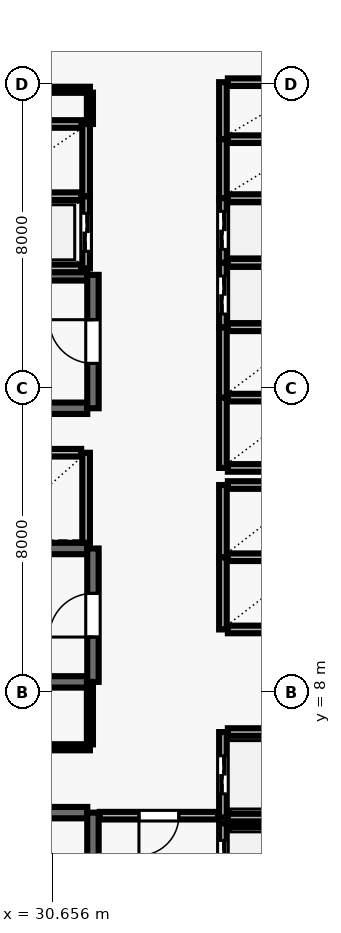
"""IFC4 building model, lengths in metres.
Left out: names, types, materials, properties, quantities, classifications, styles, units other than length and angle.
Written with IfcOpenShell. Run it as: python <this file> out.ifc"""

import sys

from ifc_helpers import new_model, si_unit, direction, frame, frame_2d, origin, place, context, subcontext, project, spatial, rectangle, extrude, element, fill, save


model = new_model("IFC4")
c1 = context("Model", 3, precision=1e-05, world=origin(), true_north=direction((0.0, 1.0)))
c2 = subcontext(c1, "Body", "Model", "MODEL_VIEW")
j1 = project(units=[si_unit("LENGTHUNIT", "METRE"), si_unit("PLANEANGLEUNIT", "RADIAN")], contexts=[c1])
p1 = place(None, origin())
s1 = spatial("IfcSite", under=j1, at=p1, CompositionType="ELEMENT")
p2 = place(p1, origin())
s2 = spatial("IfcBuilding", under=s1, at=p2, CompositionType="ELEMENT")
p3 = place(p2, frame((0.0, 0.0, 103.4)))
s3 = spatial("IfcBuildingStorey", under=s2, at=p3, CompositionType="ELEMENT", Elevation=103.4)
p4 = place(p3, frame((31.58, 4.83, 0.0), z_axis=(0.0, 0.0, 1.0), x_axis=(-1.0, 0.0, 0.0)))
e1 = element("IfcWall", 1, at=p4, inside=s3, PredefinedType="SHEAR", context=c2, shape_type="SweptSolid", body=[
    extrude(rectangle(XDim=8.36, YDim=0.3, at=frame_2d((4.18, 0.0))), origin(), (0.0, 0.0, 1.0), 3.69),
])
p5 = place(p3, frame((31.73, 0.96, 0.0), z_axis=(0.0, 0.0, 1.0), x_axis=(0.0, 1.0, 0.0)))
e2 = element("IfcWall", 2, at=p5, inside=s3, PredefinedType="SHEAR", context=c2, shape_type="SweptSolid", body=[
    extrude(rectangle(XDim=3.87, YDim=0.3, at=frame_2d((1.935, 0.0))), origin(), (0.0, 0.0, 1.0), 3.69),
])
p6 = place(p5, frame((1.54, 0.0, 0.0)))
e3 = element("IfcOpeningElement", 3, at=p6, cuts=e2, PredefinedType="OPENING", context=c2, shape_type="SweptSolid", body=[
    extrude(rectangle(XDim=1.15, YDim=2.15, at=frame_2d((0.575, 1.075))), frame((0.0, 0.16, 0.0), z_axis=(0.0, -1.0, 0.0), x_axis=(1.0, 0.0, 0.0)), (0.0, 0.0, 1.0), 0.32),
])
for number, where, z_axis, x_axis in (
    (4, (31.58, 18.98, 0.0), (0.0, 0.0, 1.0), (-1.0, 0.0, 0.0)),
    (5, (23.22, 15.47, 0.0), (0.0, 0.0, 1.0), (1.0, 0.0, 0.0)),
):
    element("IfcWall", number, at=place(p3, frame(where, z_axis=z_axis, x_axis=x_axis)), inside=s3, PredefinedType="SHEAR", context=c2, shape_type="SweptSolid", body=[
        extrude(rectangle(XDim=8.36, YDim=0.3, at=frame_2d((4.18, 0.0))), origin(), (0.0, 0.0, 1.0), 3.69),
    ])
p7 = place(p3, frame((31.73, 15.47, 0.0), z_axis=(0.0, 0.0, 1.0), x_axis=(0.0, 1.0, 0.0)))
e6 = element("IfcWall", 6, at=p7, inside=s3, PredefinedType="SHEAR", context=c2, shape_type="SweptSolid", body=[
    extrude(rectangle(XDim=3.51, YDim=0.3, at=frame_2d((1.755, 0.0))), origin(), (0.0, 0.0, 1.0), 3.69),
])
p8 = place(p7, frame((1.18, 0.0, 0.0)))
e7 = element("IfcOpeningElement", 7, at=p8, cuts=e6, PredefinedType="OPENING", context=c2, shape_type="SweptSolid", body=[
    extrude(rectangle(XDim=1.15, YDim=2.15, at=frame_2d((0.575, 1.075))), frame((0.0, 0.16, 0.0), z_axis=(0.0, -1.0, 0.0), x_axis=(1.0, 0.0, 0.0)), (0.0, 0.0, 1.0), 0.32),
])
for number, where, z_axis, x_axis in (
    (8, (31.58, 11.78, 0.0), (0.0, 0.0, 1.0), (-1.0, 0.0, 0.0)),
    (9, (23.22, 8.27, 0.0), (0.0, 0.0, 1.0), (1.0, 0.0, 0.0)),
):
    element("IfcWall", number, at=place(p3, frame(where, z_axis=z_axis, x_axis=x_axis)), inside=s3, PredefinedType="SHEAR", context=c2, shape_type="SweptSolid", body=[
        extrude(rectangle(XDim=8.36, YDim=0.3, at=frame_2d((4.18, 0.0))), origin(), (0.0, 0.0, 1.0), 3.69),
    ])
p9 = place(p3, frame((31.73, 8.27, 0.0), z_axis=(0.0, 0.0, 1.0), x_axis=(0.0, 1.0, 0.0)))
e10 = element("IfcWall", 10, at=p9, inside=s3, PredefinedType="SHEAR", context=c2, shape_type="SweptSolid", body=[
    extrude(rectangle(XDim=3.51, YDim=0.3, at=frame_2d((1.755, 0.0))), origin(), (0.0, 0.0, 1.0), 3.69),
])
p10 = place(p9, frame((1.18, 0.0, 0.0)))
e11 = element("IfcOpeningElement", 11, at=p10, cuts=e10, PredefinedType="OPENING", context=c2, shape_type="SweptSolid", body=[
    extrude(rectangle(XDim=1.15, YDim=2.15, at=frame_2d((0.575, 1.075))), frame((0.0, 0.16, 0.0), z_axis=(0.0, -1.0, 0.0), x_axis=(1.0, 0.0, 0.0)), (0.0, 0.0, 1.0), 0.32),
])
p11 = place(p3, frame((35.15, 4.55, 0.0), z_axis=(0.0, 0.0, 1.0), x_axis=(0.0, -1.0, 0.0)))
e12 = element("IfcWall", 12, at=p11, inside=s3, PredefinedType="SOLIDWALL", context=c2, shape_type="SweptSolid", body=[
    extrude(rectangle(XDim=2.1, YDim=0.2, at=frame_2d((1.05, 0.0))), origin(), (0.0, 0.0, 1.0), 3.69),
])
p12 = place(p11, frame((0.45, 0.0, 0.0)))
e13 = element("IfcOpeningElement", 13, at=p12, cuts=e12, PredefinedType="OPENING", context=c2, shape_type="SweptSolid", body=[
    extrude(rectangle(XDim=1.2, YDim=2.15, at=frame_2d((0.6, 1.075))), frame((0.0, 0.11, 0.0), z_axis=(0.0, -1.0, 0.0), x_axis=(1.0, 0.0, 0.0)), (0.0, 0.0, 1.0), 0.22),
])
p13 = place(p3, frame((37.42, 4.55, 0.0), z_axis=(0.0, 0.0, 1.0), x_axis=(-1.0, 0.0, 0.0)))
e14 = element("IfcWall", 14, at=p13, inside=s3, PredefinedType="SOLIDWALL", context=c2, shape_type="SweptSolid", body=[
    extrude(rectangle(XDim=2.14, YDim=0.2, at=frame_2d((1.07, 0.0))), origin(), (0.0, 0.0, 1.0), 3.69),
])
p14 = place(p3, frame((35.15, 6.95, 0.0), z_axis=(0.0, 0.0, 1.0), x_axis=(0.0, -1.0, 0.0)))
e15 = element("IfcWall", 15, at=p14, inside=s3, PredefinedType="SOLIDWALL", context=c2, shape_type="SweptSolid", body=[
    extrude(rectangle(XDim=2.25, YDim=0.2, at=frame_2d((1.125, 0.0))), origin(), (0.0, 0.0, 1.0), 3.69),
])
p15 = place(p14, frame((0.625, 0.0, 0.0)))
e16 = element("IfcOpeningElement", 16, at=p15, cuts=e15, PredefinedType="OPENING", context=c2, shape_type="SweptSolid", body=[
    extrude(rectangle(XDim=1.0, YDim=2.1, at=frame_2d((0.5, 1.05))), frame((0.0, 0.11, 0.0), z_axis=(0.0, -1.0, 0.0), x_axis=(1.0, 0.0, 0.0)), (0.0, 0.0, 1.0), 0.22),
])
for number, where, z_axis, x_axis in (
    (17, (35.28, 4.7, 0.0), (0.0, 0.0, 1.0), (1.0, 0.0, 0.0)),
    (18, (37.42, 6.95, 0.0), (0.0, 0.0, 1.0), (-1.0, 0.0, 0.0)),
):
    element("IfcWall", number, at=place(p3, frame(where, z_axis=z_axis, x_axis=x_axis)), inside=s3, PredefinedType="SOLIDWALL", context=c2, shape_type="SweptSolid", body=[
        extrude(rectangle(XDim=2.14, YDim=0.2, at=frame_2d((1.07, 0.0))), origin(), (0.0, 0.0, 1.0), 3.69),
    ])
p16 = place(p3, frame((35.15, 11.55, 0.0), z_axis=(0.0, 0.0, 1.0), x_axis=(0.0, -1.0, 0.0)))
e19 = element("IfcWall", 19, at=p16, inside=s3, PredefinedType="SOLIDWALL", context=c2, shape_type="SweptSolid", body=[
    extrude(rectangle(XDim=1.9, YDim=0.2, at=frame_2d((0.95, 0.0))), origin(), (0.0, 0.0, 1.0), 3.69),
])
for number, where, z_axis, x_axis in (
    (20, (35.28, 9.65, 0.0), (0.0, 0.0, 1.0), (1.0, 0.0, 0.0)),
    (21, (37.42, 11.55, 0.0), (0.0, 0.0, 1.0), (-1.0, 0.0, 0.0)),
):
    element("IfcWall", number, at=place(p3, frame(where, z_axis=z_axis, x_axis=x_axis)), inside=s3, PredefinedType="SOLIDWALL", context=c2, shape_type="SweptSolid", body=[
        extrude(rectangle(XDim=2.14, YDim=0.2, at=frame_2d((1.07, 0.0))), origin(), (0.0, 0.0, 1.0), 3.69),
    ])
p17 = place(p3, frame((35.15, 13.45, 0.0), z_axis=(0.0, 0.0, 1.0), x_axis=(0.0, -1.0, 0.0)))
e22 = element("IfcWall", 22, at=p17, inside=s3, PredefinedType="SOLIDWALL", context=c2, shape_type="SweptSolid", body=[
    extrude(rectangle(XDim=1.9, YDim=0.2, at=frame_2d((0.95, 0.0))), origin(), (0.0, 0.0, 1.0), 3.69),
])
p18 = place(p3, frame((37.42, 13.45, 0.0), z_axis=(0.0, 0.0, 1.0), x_axis=(-1.0, 0.0, 0.0)))
e23 = element("IfcWall", 23, at=p18, inside=s3, PredefinedType="SOLIDWALL", context=c2, shape_type="SweptSolid", body=[
    extrude(rectangle(XDim=2.14, YDim=0.2, at=frame_2d((1.07, 0.0))), origin(), (0.0, 0.0, 1.0), 3.69),
])
p19 = place(p3, frame((31.55, 11.93, 0.0), z_axis=(0.0, 0.0, 1.0), x_axis=(0.0, 1.0, 0.0)))
e24 = element("IfcWall", 24, at=p19, inside=s3, PredefinedType="SOLIDWALL", context=c2, shape_type="SweptSolid", body=[
    extrude(rectangle(XDim=2.37, YDim=0.2, at=frame_2d((1.185, 0.0))), origin(), (0.0, 0.0, 1.0), 3.69),
])
p20 = place(p3, frame((31.42, 14.3, 0.0), z_axis=(0.0, 0.0, 1.0), x_axis=(-1.0, 0.0, 0.0)))
e25 = element("IfcWall", 25, at=p20, inside=s3, PredefinedType="SOLIDWALL", context=c2, shape_type="SweptSolid", body=[
    extrude(rectangle(XDim=2.44, YDim=0.2, at=frame_2d((1.22, 0.0))), origin(), (0.0, 0.0, 1.0), 3.69),
])
p21 = place(p3, frame((35.15, 15.75, 0.0), z_axis=(0.0, 0.0, 1.0), x_axis=(0.0, -1.0, 0.0)))
e26 = element("IfcWall", 26, at=p21, inside=s3, PredefinedType="SOLIDWALL", context=c2, shape_type="SweptSolid", body=[
    extrude(rectangle(XDim=1.85, YDim=0.2, at=frame_2d((0.925, 0.0))), origin(), (0.0, 0.0, 1.0), 3.69),
])
for number, where, z_axis, x_axis in (
    (27, (35.28, 13.9, 0.0), (0.0, 0.0, 1.0), (1.0, 0.0, 0.0)),
    (28, (37.42, 15.75, 0.0), (0.0, 0.0, 1.0), (-1.0, 0.0, 0.0)),
):
    element("IfcWall", number, at=place(p3, frame(where, z_axis=z_axis, x_axis=x_axis)), inside=s3, PredefinedType="SOLIDWALL", context=c2, shape_type="SweptSolid", body=[
        extrude(rectangle(XDim=2.14, YDim=0.2, at=frame_2d((1.07, 0.0))), origin(), (0.0, 0.0, 1.0), 3.69),
    ])
p22 = place(p3, frame((35.15, 17.6, 0.0), z_axis=(0.0, 0.0, 1.0), x_axis=(0.0, -1.0, 0.0)))
e29 = element("IfcWall", 29, at=p22, inside=s3, PredefinedType="SOLIDWALL", context=c2, shape_type="SweptSolid", body=[
    extrude(rectangle(XDim=1.85, YDim=0.2, at=frame_2d((0.925, 0.0))), origin(), (0.0, 0.0, 1.0), 3.69),
])
p23 = place(p3, frame((37.42, 17.6, 0.0), z_axis=(0.0, 0.0, 1.0), x_axis=(-1.0, 0.0, 0.0)))
e30 = element("IfcWall", 30, at=p23, inside=s3, PredefinedType="SOLIDWALL", context=c2, shape_type="SweptSolid", body=[
    extrude(rectangle(XDim=2.14, YDim=0.2, at=frame_2d((1.07, 0.0))), origin(), (0.0, 0.0, 1.0), 3.69),
])
p24 = place(p3, frame((35.15, 19.3, 0.0), z_axis=(0.0, 0.0, 1.0), x_axis=(0.0, -1.0, 0.0)))
e31 = element("IfcWall", 31, at=p24, inside=s3, PredefinedType="SOLIDWALL", context=c2, shape_type="SweptSolid", body=[
    extrude(rectangle(XDim=1.7, YDim=0.2, at=frame_2d((0.85, 0.0))), origin(), (0.0, 0.0, 1.0), 3.69),
])
p25 = place(p24, frame((0.35, 0.0, 0.0)))
e32 = element("IfcOpeningElement", 32, at=p25, cuts=e31, PredefinedType="OPENING", context=c2, shape_type="SweptSolid", body=[
    extrude(rectangle(XDim=1.0, YDim=2.1, at=frame_2d((0.5, 1.05))), frame((0.0, 0.11, 0.0), z_axis=(0.0, -1.0, 0.0), x_axis=(1.0, 0.0, 0.0)), (0.0, 0.0, 1.0), 0.22),
])
p26 = place(p3, frame((37.42, 19.3, 0.0), z_axis=(0.0, 0.0, 1.0), x_axis=(-1.0, 0.0, 0.0)))
e33 = element("IfcWall", 33, at=p26, inside=s3, PredefinedType="SOLIDWALL", context=c2, shape_type="SweptSolid", body=[
    extrude(rectangle(XDim=2.14, YDim=0.2, at=frame_2d((1.07, 0.0))), origin(), (0.0, 0.0, 1.0), 3.69),
])
p27 = place(p3, frame((35.15, 21.0, 0.0), z_axis=(0.0, 0.0, 1.0), x_axis=(0.0, -1.0, 0.0)))
e34 = element("IfcWall", 34, at=p27, inside=s3, PredefinedType="SOLIDWALL", context=c2, shape_type="SweptSolid", body=[
    extrude(rectangle(XDim=1.7, YDim=0.2, at=frame_2d((0.85, 0.0))), origin(), (0.0, 0.0, 1.0), 3.69),
])
p28 = place(p27, frame((0.35, 0.0, 0.0)))
e35 = element("IfcOpeningElement", 35, at=p28, cuts=e34, PredefinedType="OPENING", context=c2, shape_type="SweptSolid", body=[
    extrude(rectangle(XDim=1.0, YDim=2.1, at=frame_2d((0.5, 1.05))), frame((0.0, 0.11, 0.0), z_axis=(0.0, -1.0, 0.0), x_axis=(1.0, 0.0, 0.0)), (0.0, 0.0, 1.0), 0.22),
])
p29 = place(p3, frame((37.42, 21.0, 0.0), z_axis=(0.0, 0.0, 1.0), x_axis=(-1.0, 0.0, 0.0)))
e36 = element("IfcWall", 36, at=p29, inside=s3, PredefinedType="SOLIDWALL", context=c2, shape_type="SweptSolid", body=[
    extrude(rectangle(XDim=2.14, YDim=0.2, at=frame_2d((1.07, 0.0))), origin(), (0.0, 0.0, 1.0), 3.69),
])
p30 = place(p3, frame((31.55, 19.15, 0.0), z_axis=(0.0, 0.0, 1.0), x_axis=(0.0, 1.0, 0.0)))
e37 = element("IfcWall", 37, at=p30, inside=s3, PredefinedType="SOLIDWALL", context=c2, shape_type="SweptSolid", body=[
    extrude(rectangle(XDim=1.9, YDim=0.2, at=frame_2d((0.95, 0.0))), origin(), (0.0, 0.0, 1.0), 3.69),
])
p31 = place(p30, frame((0.45, 0.0, 0.0)))
e38 = element("IfcOpeningElement", 38, at=p31, cuts=e37, PredefinedType="OPENING", context=c2, shape_type="SweptSolid", body=[
    extrude(rectangle(XDim=1.0, YDim=2.1, at=frame_2d((0.5, 1.05))), frame((0.0, 0.11, 0.0), z_axis=(0.0, -1.0, 0.0), x_axis=(1.0, 0.0, 0.0)), (0.0, 0.0, 1.0), 0.22),
])
for number, where, z_axis, x_axis in (
    (39, (28.98, 19.15, 0.0), (0.0, 0.0, 1.0), (1.0, 0.0, 0.0)),
    (40, (31.42, 21.05, 0.0), (0.0, 0.0, 1.0), (-1.0, 0.0, 0.0)),
):
    element("IfcWall", number, at=place(p3, frame(where, z_axis=z_axis, x_axis=x_axis)), inside=s3, PredefinedType="SOLIDWALL", context=c2, shape_type="SweptSolid", body=[
        extrude(rectangle(XDim=2.44, YDim=0.2, at=frame_2d((1.22, 0.0))), origin(), (0.0, 0.0, 1.0), 3.69),
    ])
p32 = place(p3, frame((35.15, 22.55, 0.0), z_axis=(0.0, 0.0, 1.0), x_axis=(0.0, -1.0, 0.0)))
e41 = element("IfcWall", 41, at=p32, inside=s3, PredefinedType="SOLIDWALL", context=c2, shape_type="SweptSolid", body=[
    extrude(rectangle(XDim=1.55, YDim=0.2, at=frame_2d((0.775, 0.0))), origin(), (0.0, 0.0, 1.0), 3.69),
])
p33 = place(p3, frame((37.42, 22.55, 0.0), z_axis=(0.0, 0.0, 1.0), x_axis=(-1.0, 0.0, 0.0)))
e42 = element("IfcWall", 42, at=p33, inside=s3, PredefinedType="SOLIDWALL", context=c2, shape_type="SweptSolid", body=[
    extrude(rectangle(XDim=2.14, YDim=0.2, at=frame_2d((1.07, 0.0))), origin(), (0.0, 0.0, 1.0), 3.69),
])
p34 = place(p3, frame((35.15, 24.05, 0.0), z_axis=(0.0, 0.0, 1.0), x_axis=(0.0, -1.0, 0.0)))
e43 = element("IfcWall", 43, at=p34, inside=s3, PredefinedType="SOLIDWALL", context=c2, shape_type="SweptSolid", body=[
    extrude(rectangle(XDim=1.5, YDim=0.2, at=frame_2d((0.75, 0.0))), origin(), (0.0, 0.0, 1.0), 3.69),
])
p35 = place(p3, frame((37.42, 24.05, 0.0), z_axis=(0.0, 0.0, 1.0), x_axis=(-1.0, 0.0, 0.0)))
e44 = element("IfcWall", 44, at=p35, inside=s3, PredefinedType="SOLIDWALL", context=c2, shape_type="SweptSolid", body=[
    extrude(rectangle(XDim=2.14, YDim=0.2, at=frame_2d((1.07, 0.0))), origin(), (0.0, 0.0, 1.0), 3.69),
])
p36 = place(p3, frame((31.55, 21.05, 0.0), z_axis=(0.0, 0.0, 1.0), x_axis=(0.0, 1.0, 0.0)))
e45 = element("IfcWall", 45, at=p36, inside=s3, PredefinedType="SOLIDWALL", context=c2, shape_type="SweptSolid", body=[
    extrude(rectangle(XDim=1.9, YDim=0.2, at=frame_2d((0.95, 0.0))), origin(), (0.0, 0.0, 1.0), 3.69),
])
p37 = place(p3, frame((31.43, 22.95, 0.0), z_axis=(0.0, 0.0, 1.0), x_axis=(-1.0, 0.0, 0.0)))
e46 = element("IfcWall", 46, at=p37, inside=s3, PredefinedType="SOLIDWALL", context=c2, shape_type="SweptSolid", body=[
    extrude(rectangle(XDim=2.46, YDim=0.2, at=frame_2d((1.23, 0.0))), origin(), (0.0, 0.0, 1.0), 3.69),
])
p38 = place(p3, frame((28.8, 23.85, 0.0), z_axis=(0.0, 0.0, 1.0), x_axis=(1.0, 0.0, 0.0)))
e47 = element("IfcWall", 47, at=p38, inside=s3, PredefinedType="PARTITIONING", context=c2, shape_type="SweptSolid", body=[
    extrude(rectangle(XDim=2.85, YDim=0.16, at=frame_2d((1.425, 0.0))), origin(), (0.0, 0.0, 1.0), 3.074),
])
p39 = place(p3, frame((31.65, 6.55, 0.0), z_axis=(0.0, 0.0, 1.0), x_axis=(-1.0, 0.0, 0.0)))
e48 = element("IfcWall", 48, at=p39, inside=s3, PredefinedType="PARTITIONING", context=c2, shape_type="SweptSolid", body=[
    extrude(rectangle(XDim=4.75, YDim=0.16, at=frame_2d((2.375, 0.0))), origin(), (0.0, 0.0, 1.0), 3.69),
])
p40 = place(p39, frame((1.935, 0.0, 0.0)))
e49 = element("IfcOpeningElement", 49, at=p40, cuts=e48, PredefinedType="OPENING", context=c2, shape_type="SweptSolid", body=[
    extrude(rectangle(XDim=0.88, YDim=2.1, at=frame_2d((0.44, 1.05))), frame((0.0, 0.09, 0.0), z_axis=(0.0, -1.0, 0.0), x_axis=(1.0, 0.0, 0.0)), (0.0, 0.0, 1.0), 0.18),
])
p41 = place(p3, frame((35.02, 4.75, 0.0), z_axis=(0.0, 0.0, 1.0), x_axis=(-1.0, 0.0, 0.0)))
e50 = element("IfcWall", 50, at=p41, inside=s3, PredefinedType="SOLIDWALL", context=c2, shape_type="SweptSolid", body=[
    extrude(rectangle(XDim=3.11, YDim=0.2, at=frame_2d((1.555, 0.0))), origin(), (0.0, 0.0, 1.0), 3.69),
])
p42 = place(p41, frame((1.03, 0.0, 0.0)))
e51 = element("IfcOpeningElement", 51, at=p42, cuts=e50, PredefinedType="OPENING", context=c2, shape_type="SweptSolid", body=[
    extrude(rectangle(XDim=1.05, YDim=2.15, at=frame_2d((0.525, 1.075))), frame((0.0, 0.11, 0.0), z_axis=(0.0, -1.0, 0.0), x_axis=(1.0, 0.0, 0.0)), (0.0, 0.0, 1.0), 0.22),
])
p43 = place(p3, frame((31.65, 8.24, 0.0), z_axis=(0.0, 0.0, 1.0), x_axis=(0.0, -1.0, 0.0)))
e52 = element("IfcWall", 52, at=p43, inside=s3, PredefinedType="PARTITIONING", context=c2, shape_type="SweptSolid", body=[
    extrude(rectangle(XDim=1.615, YDim=0.16, at=frame_2d((0.808, 0.0))), origin(), (0.0, 0.0, 1.0), 3.69),
])
p44 = place(p3, frame((31.65, 23.775, 0.0), z_axis=(0.0, 0.0, 1.0), x_axis=(0.0, -1.0, 0.0)))
e53 = element("IfcWall", 53, at=p44, inside=s3, PredefinedType="PARTITIONING", context=c2, shape_type="SweptSolid", body=[
    extrude(rectangle(XDim=0.825, YDim=0.16, at=frame_2d((0.413, 0.0))), origin(), (0.0, 0.0, 1.0), 3.69),
])
p45 = place(p8, origin())
e54 = element("IfcDoor", 54, at=p45, inside=s3, OperationType="SINGLE_SWING_RIGHT", PredefinedType="DOOR", context=c2, shape_type="SweptSolid", body=[
    extrude(rectangle(XDim=1.15, YDim=2.15, at=frame_2d((0.575, 1.075))), frame((0.0, 0.025, 0.0), z_axis=(0.0, -1.0, 0.0), x_axis=(1.0, 0.0, 0.0)), (0.0, 0.0, 1.0), 0.05),
])
fill(e7, e54)
p46 = place(p10, origin())
e55 = element("IfcDoor", 55, at=p46, inside=s3, OperationType="SINGLE_SWING_LEFT", PredefinedType="DOOR", context=c2, shape_type="SweptSolid", body=[
    extrude(rectangle(XDim=1.15, YDim=2.15, at=frame_2d((0.575, 1.075))), frame((0.0, 0.025, 0.0), z_axis=(0.0, -1.0, 0.0), x_axis=(1.0, 0.0, 0.0)), (0.0, 0.0, 1.0), 0.05),
])
fill(e11, e55)
p47 = place(p12, origin())
e56 = element("IfcDoor", 56, at=p47, inside=s3, OperationType="DOUBLE_DOOR_SLIDING", PredefinedType="DOOR", context=c2, shape_type="SweptSolid", body=[
    extrude(rectangle(XDim=1.2, YDim=2.15, at=frame_2d((0.6, 1.075))), frame((0.0, 0.025, 0.0), z_axis=(0.0, -1.0, 0.0), x_axis=(1.0, 0.0, 0.0)), (0.0, 0.0, 1.0), 0.05),
])
fill(e13, e56)
p48 = place(p15, origin())
e57 = element("IfcDoor", 57, at=p48, inside=s3, OperationType="DOUBLE_DOOR_SLIDING", PredefinedType="DOOR", context=c2, shape_type="SweptSolid", body=[
    extrude(rectangle(XDim=1.0, YDim=2.1, at=frame_2d((0.5, 1.05))), frame((0.0, 0.025, 0.0), z_axis=(0.0, -1.0, 0.0), x_axis=(1.0, 0.0, 0.0)), (0.0, 0.0, 1.0), 0.05),
])
fill(e16, e57)
p49 = place(p25, origin())
e58 = element("IfcDoor", 58, at=p49, inside=s3, OperationType="DOUBLE_DOOR_SLIDING", PredefinedType="DOOR", context=c2, shape_type="SweptSolid", body=[
    extrude(rectangle(XDim=1.0, YDim=2.1, at=frame_2d((0.5, 1.05))), frame((0.0, 0.025, 0.0), z_axis=(0.0, -1.0, 0.0), x_axis=(1.0, 0.0, 0.0)), (0.0, 0.0, 1.0), 0.05),
])
fill(e32, e58)
p50 = place(p28, origin())
e59 = element("IfcDoor", 59, at=p50, inside=s3, OperationType="DOUBLE_DOOR_SLIDING", PredefinedType="DOOR", context=c2, shape_type="SweptSolid", body=[
    extrude(rectangle(XDim=1.0, YDim=2.1, at=frame_2d((0.5, 1.05))), frame((0.0, 0.025, 0.0), z_axis=(0.0, -1.0, 0.0), x_axis=(1.0, 0.0, 0.0)), (0.0, 0.0, 1.0), 0.05),
])
fill(e35, e59)
p51 = place(p31, origin())
e60 = element("IfcDoor", 60, at=p51, inside=s3, OperationType="DOUBLE_DOOR_SLIDING", PredefinedType="DOOR", context=c2, shape_type="SweptSolid", body=[
    extrude(rectangle(XDim=1.0, YDim=2.1, at=frame_2d((0.5, 1.05))), frame((0.0, 0.025, 0.0), z_axis=(0.0, -1.0, 0.0), x_axis=(1.0, 0.0, 0.0)), (0.0, 0.0, 1.0), 0.05),
])
fill(e38, e60)
p52 = place(p42, origin())
e61 = element("IfcDoor", 61, at=p52, inside=s3, OperationType="SINGLE_SWING_RIGHT", PredefinedType="DOOR", context=c2, shape_type="SweptSolid", body=[
    extrude(rectangle(XDim=1.05, YDim=2.15, at=frame_2d((0.525, 1.075))), frame((0.0, 0.025, 0.0), z_axis=(0.0, -1.0, 0.0), x_axis=(1.0, 0.0, 0.0)), (0.0, 0.0, 1.0), 0.05),
])
fill(e51, e61)
save(model, sys.argv[1])
